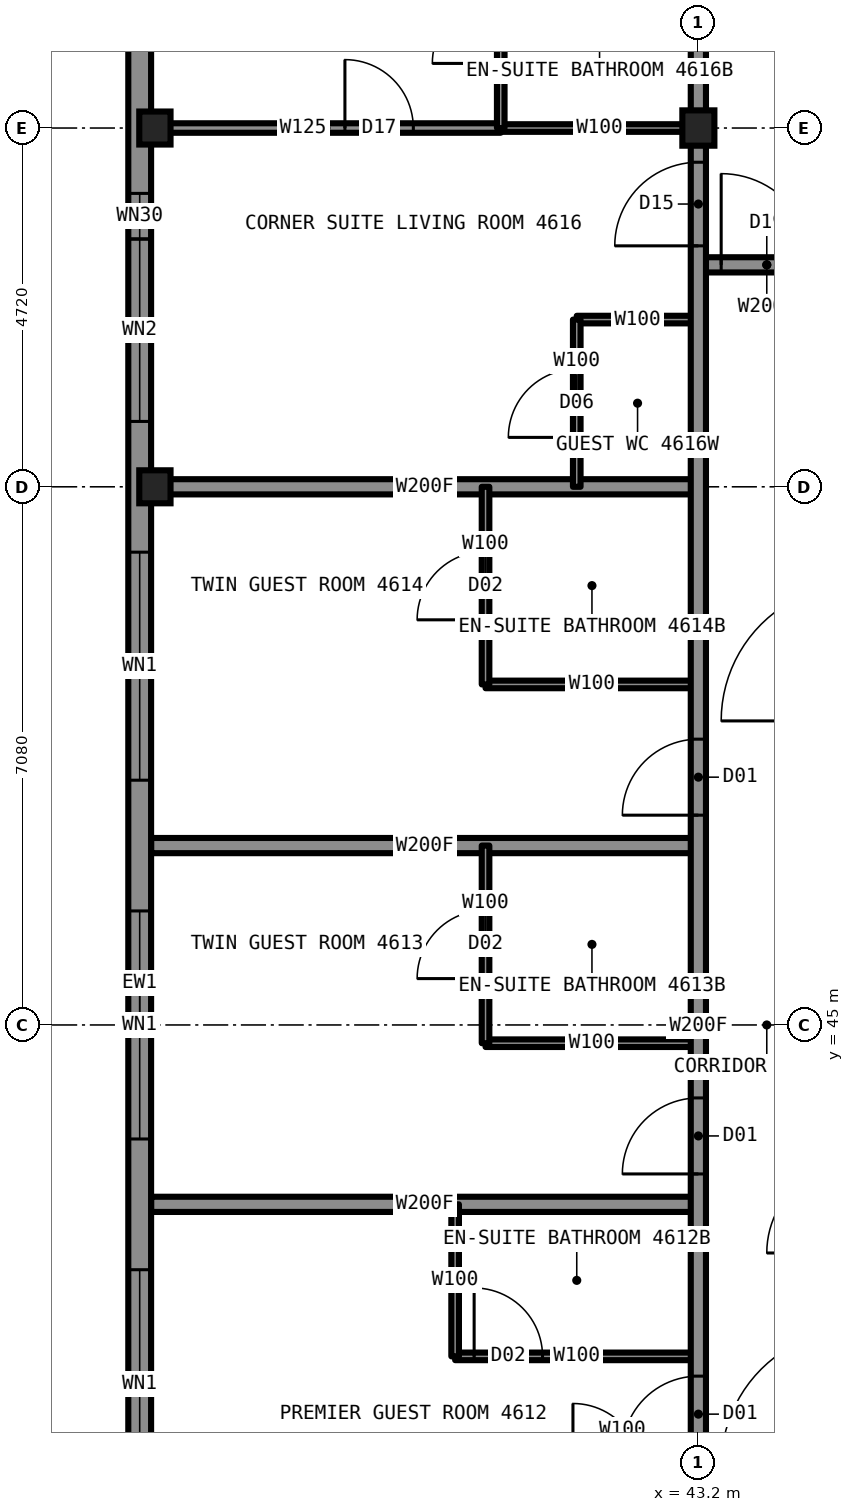
"""IFC4 building model, lengths in metres.
Left out: names, types, materials, properties, quantities, classifications, styles, units other than length and angle.
Written with IfcOpenShell. Run it as: python <this file> out.ifc"""

import sys

from ifc_helpers import new_model, si_unit, direction, frame, frame_2d, origin, origin_2d, place, context, subcontext, project, spatial, rectangle, i_section, extrude, element, fill, save


model = new_model("IFC4")
c1 = context("Model", 3, precision=1e-05, world=origin(), true_north=direction((0.0, 1.0)))
c2 = subcontext(c1, "Body", "Model", "MODEL_VIEW")
j1 = project(units=[si_unit("LENGTHUNIT", "METRE"), si_unit("PLANEANGLEUNIT", "RADIAN")], contexts=[c1])
p1 = place(None, origin())
s1 = spatial("IfcSite", under=j1, at=p1, CompositionType="ELEMENT")
p2 = place(p1, origin())
s2 = spatial("IfcBuilding", under=s1, at=p2, CompositionType="ELEMENT")
p3 = place(p2, frame((0.0, 0.0, 172.3)))
s3 = spatial("IfcBuildingStorey", under=s2, at=p3, CompositionType="ELEMENT", Elevation=172.3)
for number, where, z_axis, x_axis in (
    (1, (36.05, 52.08, 0.0), (0.0, 0.0, 1.0), (1.0, 0.0, 0.0)),
    (2, (36.05, 56.8, 0.0), (0.0, 0.0, 1.0), (1.0, 0.0, 0.0)),
):
    element("IfcColumn", number, at=place(p3, frame(where, z_axis=z_axis, x_axis=x_axis)), inside=s3, PredefinedType="COLUMN", context=c2, shape_type="SweptSolid", body=[
        extrude(i_section(OverallWidth=0.411, OverallDepth=0.434, WebThickness=0.036, FlangeThickness=0.057, at=origin_2d()), origin(), (0.0, 0.0, 1.0), 3.5),
    ])
p4 = place(p3, frame((43.2, 56.8, 0.0), z_axis=(0.0, 0.0, 1.0), x_axis=(1.0, 0.0, 0.0)))
e3 = element("IfcColumn", 3, at=p4, inside=s3, PredefinedType="COLUMN", context=c2, shape_type="SweptSolid", body=[
    extrude(i_section(OverallWidth=0.422, OverallDepth=0.465, WebThickness=0.045, FlangeThickness=0.073, at=origin_2d()), origin(), (0.0, 0.0, 1.0), 3.5),
])
p5 = place(p3, frame((40.4, 44.76, 0.0), z_axis=(0.0, 0.0, 1.0), x_axis=(1.0, 0.0, 0.0)))
e4 = element("IfcWall", 4, at=p5, inside=s3, PredefinedType="PARTITIONING", context=c2, shape_type="SweptSolid", body=[
    extrude(rectangle(XDim=2.8, YDim=0.1, at=frame_2d((1.4, 0.0))), origin(), (0.0, 0.0, 1.0), 3.33),
])
p6 = place(p3, frame((36.0, 42.64, 0.0), z_axis=(0.0, 0.0, 1.0), x_axis=(1.0, 0.0, 0.0)))
e5 = element("IfcWall", 5, at=p6, inside=s3, PredefinedType="PARTITIONING", context=c2, shape_type="SweptSolid", body=[
    extrude(rectangle(XDim=7.2, YDim=0.2, at=frame_2d((3.6, 0.0))), origin(), (0.0, 0.0, 1.0), 2.73),
])
p7 = place(p3, frame((40.0, 40.64, 0.0), z_axis=(0.0, 0.0, 1.0), x_axis=(1.0, 0.0, 0.0)))
e6 = element("IfcWall", 6, at=p7, inside=s3, PredefinedType="PARTITIONING", context=c2, shape_type="SweptSolid", body=[
    extrude(rectangle(XDim=3.2, YDim=0.1, at=frame_2d((1.6, 0.0))), origin(), (0.0, 0.0, 1.0), 3.33),
])
p8 = place(p7, frame((0.25, 0.0, 0.0)))
e7 = element("IfcOpeningElement", 7, at=p8, cuts=e6, PredefinedType="OPENING", context=c2, shape_type="SweptSolid", body=[
    extrude(rectangle(XDim=0.9, YDim=2.1, at=frame_2d((0.45, 1.05))), frame((0.0, 0.06, 0.0), z_axis=(0.0, -1.0, 0.0), x_axis=(1.0, 0.0, 0.0)), (0.0, 0.0, 1.0), 0.12),
])
p9 = place(p3, frame((43.2, 55.0, 0.0), z_axis=(0.0, 0.0, 1.0), x_axis=(1.0, 0.0, 0.0)))
e8 = element("IfcWall", 8, at=p9, inside=s3, PredefinedType="PARTITIONING", context=c2, shape_type="SweptSolid", body=[
    extrude(rectangle(XDim=1.8, YDim=0.2, at=frame_2d((0.9, 0.0))), origin(), (0.0, 0.0, 1.0), 3.33),
])
p10 = place(p9, frame((0.3, 0.0, 0.0)))
e9 = element("IfcOpeningElement", 9, at=p10, cuts=e8, PredefinedType="OPENING", context=c2, shape_type="SweptSolid", body=[
    extrude(rectangle(XDim=1.2, YDim=2.2, at=frame_2d((0.6, 1.1))), frame((0.0, 0.11, 0.0), z_axis=(0.0, -1.0, 0.0), x_axis=(1.0, 0.0, 0.0)), (0.0, 0.0, 1.0), 0.22),
])
p11 = place(p3, frame((40.6, 56.8, 0.0), z_axis=(0.0, 0.0, 1.0), x_axis=(1.0, 0.0, 0.0)))
e10 = element("IfcWall", 10, at=p11, inside=s3, PredefinedType="PARTITIONING", context=c2, shape_type="SweptSolid", body=[
    extrude(rectangle(XDim=2.6, YDim=0.1, at=frame_2d((1.3, 0.0))), origin(), (0.0, 0.0, 1.0), 2.573),
])
p12 = place(p3, frame((36.0, 56.8, 0.0), z_axis=(0.0, 0.0, 1.0), x_axis=(1.0, 0.0, 0.0)))
e11 = element("IfcWall", 11, at=p12, inside=s3, PredefinedType="PARTITIONING", context=c2, shape_type="SweptSolid", body=[
    extrude(rectangle(XDim=4.6, YDim=0.125, at=frame_2d((2.3, 0.0))), origin(), (0.0, 0.0, 1.0), 2.573),
])
p13 = place(p12, frame((2.55, 0.0, 0.0)))
e12 = element("IfcOpeningElement", 12, at=p13, cuts=e11, PredefinedType="OPENING", context=c2, shape_type="SweptSolid", body=[
    extrude(rectangle(XDim=0.9, YDim=2.2, at=frame_2d((0.45, 1.1))), frame((0.0, 0.073, 0.0), z_axis=(0.0, -1.0, 0.0), x_axis=(1.0, 0.0, 0.0)), (0.0, 0.0, 1.0), 0.145),
])
p14 = place(p3, frame((36.0, 47.36, 0.0), z_axis=(0.0, 0.0, 1.0), x_axis=(1.0, 0.0, 0.0)))
e13 = element("IfcWall", 13, at=p14, inside=s3, PredefinedType="PARTITIONING", context=c2, shape_type="SweptSolid", body=[
    extrude(rectangle(XDim=7.2, YDim=0.2, at=frame_2d((3.6, 0.0))), origin(), (0.0, 0.0, 1.0), 2.73),
])
p15 = place(p3, frame((40.4, 49.48, 0.0), z_axis=(0.0, 0.0, 1.0), x_axis=(1.0, 0.0, 0.0)))
e14 = element("IfcWall", 14, at=p15, inside=s3, PredefinedType="PARTITIONING", context=c2, shape_type="SweptSolid", body=[
    extrude(rectangle(XDim=2.8, YDim=0.1, at=frame_2d((1.4, 0.0))), origin(), (0.0, 0.0, 1.0), 3.33),
])
p16 = place(p3, frame((36.0, 52.08, 0.0), z_axis=(0.0, 0.0, 1.0), x_axis=(1.0, 0.0, 0.0)))
e15 = element("IfcWall", 15, at=p16, inside=s3, PredefinedType="PARTITIONING", context=c2, shape_type="SweptSolid", body=[
    extrude(rectangle(XDim=7.2, YDim=0.2, at=frame_2d((3.6, 0.0))), origin(), (0.0, 0.0, 1.0), 2.573),
])
p17 = place(p3, frame((41.6, 54.28, 0.0), z_axis=(0.0, 0.0, 1.0), x_axis=(1.0, 0.0, 0.0)))
e16 = element("IfcWall", 16, at=p17, inside=s3, PredefinedType="PARTITIONING", context=c2, shape_type="SweptSolid", body=[
    extrude(rectangle(XDim=1.6, YDim=0.1, at=frame_2d((0.8, 0.0))), origin(), (0.0, 0.0, 1.0), 3.33),
])
p18 = place(p3, frame((43.2, 33.2, 0.0), z_axis=(0.0, 0.0, 1.0), x_axis=(0.0, 1.0, 0.0)))
e17 = element("IfcWall", 17, at=p18, inside=s3, PredefinedType="PARTITIONING", context=c2, shape_type="SweptSolid", body=[
    extrude(rectangle(XDim=23.58, YDim=0.2, at=frame_2d((11.79, 0.0))), origin(), (0.0, 0.0, 1.0), 3.33),
])
p19 = place(p18, frame((6.18, 0.0, 0.0)))
e18 = element("IfcOpeningElement", 18, at=p19, cuts=e17, PredefinedType="OPENING", context=c2, shape_type="SweptSolid", body=[
    extrude(rectangle(XDim=1.0, YDim=2.2, at=frame_2d((0.5, 1.1))), frame((0.0, 0.11, 0.0), z_axis=(0.0, -1.0, 0.0), x_axis=(1.0, 0.0, 0.0)), (0.0, 0.0, 1.0), 0.22),
])
p20 = place(p18, frame((9.84, 0.0, 0.0)))
e19 = element("IfcOpeningElement", 19, at=p20, cuts=e17, PredefinedType="OPENING", context=c2, shape_type="SweptSolid", body=[
    extrude(rectangle(XDim=1.0, YDim=2.2, at=frame_2d((0.5, 1.1))), frame((0.0, 0.11, 0.0), z_axis=(0.0, -1.0, 0.0), x_axis=(1.0, 0.0, 0.0)), (0.0, 0.0, 1.0), 0.22),
])
p21 = place(p18, frame((14.56, 0.0, 0.0)))
e20 = element("IfcOpeningElement", 20, at=p21, cuts=e17, PredefinedType="OPENING", context=c2, shape_type="SweptSolid", body=[
    extrude(rectangle(XDim=1.0, YDim=2.2, at=frame_2d((0.5, 1.1))), frame((0.0, 0.11, 0.0), z_axis=(0.0, -1.0, 0.0), x_axis=(1.0, 0.0, 0.0)), (0.0, 0.0, 1.0), 0.22),
])
p22 = place(p18, frame((22.05, 0.0, 0.0)))
e21 = element("IfcOpeningElement", 21, at=p22, cuts=e17, PredefinedType="OPENING", context=c2, shape_type="SweptSolid", body=[
    extrude(rectangle(XDim=1.1, YDim=2.2, at=frame_2d((0.55, 1.1))), frame((0.0, 0.11, 0.0), z_axis=(0.0, -1.0, 0.0), x_axis=(1.0, 0.0, 0.0)), (0.0, 0.0, 1.0), 0.22),
])
p23 = place(p18, frame((0.66, 0.0, 0.0)))
e22 = element("IfcOpeningElement", 22, at=p23, cuts=e17, PredefinedType="OPENING", context=c2, shape_type="SweptSolid", body=[
    extrude(rectangle(XDim=1.1, YDim=2.2, at=frame_2d((0.55, 1.1))), frame((0.0, 0.11, 0.0), z_axis=(0.0, -1.0, 0.0), x_axis=(1.0, 0.0, 0.0)), (0.0, 0.0, 1.0), 0.22),
])
p24 = place(p3, frame((41.6, 52.08, 0.0), z_axis=(0.0, 0.0, 1.0), x_axis=(0.0, 1.0, 0.0)))
e23 = element("IfcWall", 23, at=p24, inside=s3, PredefinedType="PARTITIONING", context=c2, shape_type="SweptSolid", body=[
    extrude(rectangle(XDim=2.2, YDim=0.1, at=frame_2d((1.1, 0.0))), origin(), (0.0, 0.0, 1.0), 3.33),
])
p25 = place(p24, frame((0.65, 0.0, 0.0)))
e24 = element("IfcOpeningElement", 24, at=p25, cuts=e23, PredefinedType="OPENING", context=c2, shape_type="SweptSolid", body=[
    extrude(rectangle(XDim=0.9, YDim=2.1, at=frame_2d((0.45, 1.05))), frame((0.0, 0.06, 0.0), z_axis=(0.0, -1.0, 0.0), x_axis=(1.0, 0.0, 0.0)), (0.0, 0.0, 1.0), 0.12),
])
p26 = place(p3, frame((40.6, 56.8, 0.0), z_axis=(0.0, 0.0, 1.0), x_axis=(0.0, 1.0, 0.0)))
e25 = element("IfcWall", 25, at=p26, inside=s3, PredefinedType="PARTITIONING", context=c2, shape_type="SweptSolid", body=[
    extrude(rectangle(XDim=2.6, YDim=0.1, at=frame_2d((1.3, 0.0))), origin(), (0.0, 0.0, 1.0), 3.33),
])
p27 = place(p26, frame((0.85, 0.0, 0.0)))
e26 = element("IfcOpeningElement", 26, at=p27, cuts=e25, PredefinedType="OPENING", context=c2, shape_type="SweptSolid", body=[
    extrude(rectangle(XDim=0.9, YDim=2.1, at=frame_2d((0.45, 1.05))), frame((0.0, 0.06, 0.0), z_axis=(0.0, -1.0, 0.0), x_axis=(1.0, 0.0, 0.0)), (0.0, 0.0, 1.0), 0.12),
])
p28 = place(p3, frame((40.4, 44.76, 0.0), z_axis=(0.0, 0.0, 1.0), x_axis=(0.0, 1.0, 0.0)))
e27 = element("IfcWall", 27, at=p28, inside=s3, PredefinedType="PARTITIONING", context=c2, shape_type="SweptSolid", body=[
    extrude(rectangle(XDim=2.6, YDim=0.1, at=frame_2d((1.3, 0.0))), origin(), (0.0, 0.0, 1.0), 3.33),
])
p29 = place(p28, frame((0.85, 0.0, 0.0)))
e28 = element("IfcOpeningElement", 28, at=p29, cuts=e27, PredefinedType="OPENING", context=c2, shape_type="SweptSolid", body=[
    extrude(rectangle(XDim=0.9, YDim=2.1, at=frame_2d((0.45, 1.05))), frame((0.0, 0.06, 0.0), z_axis=(0.0, -1.0, 0.0), x_axis=(1.0, 0.0, 0.0)), (0.0, 0.0, 1.0), 0.12),
])
p30 = place(p3, frame((40.4, 49.48, 0.0), z_axis=(0.0, 0.0, 1.0), x_axis=(0.0, 1.0, 0.0)))
e29 = element("IfcWall", 29, at=p30, inside=s3, PredefinedType="PARTITIONING", context=c2, shape_type="SweptSolid", body=[
    extrude(rectangle(XDim=2.6, YDim=0.1, at=frame_2d((1.3, 0.0))), origin(), (0.0, 0.0, 1.0), 3.33),
])
p31 = place(p30, frame((0.85, 0.0, 0.0)))
e30 = element("IfcOpeningElement", 30, at=p31, cuts=e29, PredefinedType="OPENING", context=c2, shape_type="SweptSolid", body=[
    extrude(rectangle(XDim=0.9, YDim=2.1, at=frame_2d((0.45, 1.05))), frame((0.0, 0.06, 0.0), z_axis=(0.0, -1.0, 0.0), x_axis=(1.0, 0.0, 0.0)), (0.0, 0.0, 1.0), 0.12),
])
p32 = place(p3, frame((40.0, 40.64, 0.0), z_axis=(0.0, 0.0, 1.0), x_axis=(0.0, 1.0, 0.0)))
e31 = element("IfcWall", 31, at=p32, inside=s3, PredefinedType="PARTITIONING", context=c2, shape_type="SweptSolid", body=[
    extrude(rectangle(XDim=2.0, YDim=0.1, at=frame_2d((1.0, 0.0))), origin(), (0.0, 0.0, 1.0), 3.33),
])
p33 = place(p3, frame((35.85, 58.8, 0.0), z_axis=(0.0, 0.0, 1.0), x_axis=(0.0, -1.0, 0.0)))
e32 = element("IfcWall", 32, at=p33, inside=s3, PredefinedType="SOLIDWALL", context=c2, shape_type="SweptSolid", body=[
    extrude(rectangle(XDim=27.6, YDim=0.3, at=frame_2d((13.8, 0.0))), origin(), (0.0, 0.0, 1.0), 2.83),
])
p34 = place(p33, frame((3.46, 0.0, 0.3)))
e33 = element("IfcOpeningElement", 33, at=p34, cuts=e32, PredefinedType="OPENING", context=c2, shape_type="SweptSolid", body=[
    extrude(rectangle(XDim=2.4, YDim=2.0, at=frame_2d((1.2, 1.0))), frame((0.0, 0.16, 0.0), z_axis=(0.0, -1.0, 0.0), x_axis=(1.0, 0.0, 0.0)), (0.0, 0.0, 1.0), 0.32),
])
p35 = place(p33, frame((7.58, 0.0, 0.3)))
e34 = element("IfcOpeningElement", 34, at=p35, cuts=e32, PredefinedType="OPENING", context=c2, shape_type="SweptSolid", body=[
    extrude(rectangle(XDim=3.0, YDim=2.0, at=frame_2d((1.5, 1.0))), frame((0.0, 0.16, 0.0), z_axis=(0.0, -1.0, 0.0), x_axis=(1.0, 0.0, 0.0)), (0.0, 0.0, 1.0), 0.32),
])
p36 = place(p33, frame((12.3, 0.0, 0.3)))
e35 = element("IfcOpeningElement", 35, at=p36, cuts=e32, PredefinedType="OPENING", context=c2, shape_type="SweptSolid", body=[
    extrude(rectangle(XDim=3.0, YDim=2.0, at=frame_2d((1.5, 1.0))), frame((0.0, 0.16, 0.0), z_axis=(0.0, -1.0, 0.0), x_axis=(1.0, 0.0, 0.0)), (0.0, 0.0, 1.0), 0.32),
])
p37 = place(p33, frame((17.02, 0.0, 0.3)))
e36 = element("IfcOpeningElement", 36, at=p37, cuts=e32, PredefinedType="OPENING", context=c2, shape_type="SweptSolid", body=[
    extrude(rectangle(XDim=3.0, YDim=2.0, at=frame_2d((1.5, 1.0))), frame((0.0, 0.16, 0.0), z_axis=(0.0, -1.0, 0.0), x_axis=(1.0, 0.0, 0.0)), (0.0, 0.0, 1.0), 0.32),
])
p38 = place(p33, frame((21.74, 0.0, 0.3)))
e37 = element("IfcOpeningElement", 37, at=p38, cuts=e32, PredefinedType="OPENING", context=c2, shape_type="SweptSolid", body=[
    extrude(rectangle(XDim=2.4, YDim=2.0, at=frame_2d((1.2, 1.0))), frame((0.0, 0.16, 0.0), z_axis=(0.0, -1.0, 0.0), x_axis=(1.0, 0.0, 0.0)), (0.0, 0.0, 1.0), 0.32),
])
p39 = place(p33, frame((2.86, 0.0, 0.3)))
e38 = element("IfcOpeningElement", 38, at=p39, cuts=e32, PredefinedType="OPENING", context=c2, shape_type="SweptSolid", body=[
    extrude(rectangle(XDim=0.6, YDim=1.1, at=frame_2d((0.3, 0.55))), frame((0.0, 0.16, 0.0), z_axis=(0.0, -1.0, 0.0), x_axis=(1.0, 0.0, 0.0)), (0.0, 0.0, 1.0), 0.32),
])
p40 = place(p33, frame((24.14, 0.0, 0.3)))
e39 = element("IfcOpeningElement", 39, at=p40, cuts=e32, PredefinedType="OPENING", context=c2, shape_type="SweptSolid", body=[
    extrude(rectangle(XDim=0.6, YDim=1.1, at=frame_2d((0.3, 0.55))), frame((0.0, 0.16, 0.0), z_axis=(0.0, -1.0, 0.0), x_axis=(1.0, 0.0, 0.0)), (0.0, 0.0, 1.0), 0.32),
])
p41 = place(p3, frame((43.2, 56.78, 0.0), z_axis=(0.0, 0.0, 1.0), x_axis=(0.0, 1.0, 0.0)))
e40 = element("IfcWall", 40, at=p41, inside=s3, PredefinedType="PARTITIONING", context=c2, shape_type="SweptSolid", body=[
    extrude(rectangle(XDim=2.62, YDim=0.2, at=frame_2d((1.31, 0.0))), origin(), (0.0, 0.0, 1.0), 2.573),
])
p42 = place(p10, origin())
e41 = element("IfcDoor", 41, at=p42, inside=s3, OperationType="SINGLE_SWING_LEFT", PredefinedType="DOOR", context=c2, shape_type="SweptSolid", body=[
    extrude(rectangle(XDim=1.2, YDim=2.2, at=frame_2d((0.6, 1.1))), frame((0.0, 0.025, 0.0), z_axis=(0.0, -1.0, 0.0), x_axis=(1.0, 0.0, 0.0)), (0.0, 0.0, 1.0), 0.05),
])
fill(e9, e41)
p43 = place(p19, origin())
e42 = element("IfcDoor", 42, at=p43, inside=s3, OperationType="SINGLE_SWING_LEFT", PredefinedType="DOOR", context=c2, shape_type="SweptSolid", body=[
    extrude(rectangle(XDim=1.0, YDim=2.2, at=frame_2d((0.5, 1.1))), frame((0.0, 0.025, 0.0), z_axis=(0.0, -1.0, 0.0), x_axis=(1.0, 0.0, 0.0)), (0.0, 0.0, 1.0), 0.05),
])
fill(e18, e42)
p44 = place(p8, origin())
e43 = element("IfcDoor", 43, at=p44, inside=s3, OperationType="SINGLE_SWING_RIGHT", PredefinedType="DOOR", context=c2, shape_type="SweptSolid", body=[
    extrude(rectangle(XDim=0.9, YDim=2.1, at=frame_2d((0.45, 1.05))), frame((0.0, 0.025, 0.0), z_axis=(0.0, -1.0, 0.0), x_axis=(1.0, 0.0, 0.0)), (0.0, 0.0, 1.0), 0.05),
])
fill(e7, e43)
p45 = place(p20, origin())
e44 = element("IfcDoor", 44, at=p45, inside=s3, OperationType="SINGLE_SWING_LEFT", PredefinedType="DOOR", context=c2, shape_type="SweptSolid", body=[
    extrude(rectangle(XDim=1.0, YDim=2.2, at=frame_2d((0.5, 1.1))), frame((0.0, 0.025, 0.0), z_axis=(0.0, -1.0, 0.0), x_axis=(1.0, 0.0, 0.0)), (0.0, 0.0, 1.0), 0.05),
])
fill(e19, e44)
p46 = place(p29, origin())
e45 = element("IfcDoor", 45, at=p46, inside=s3, OperationType="SINGLE_SWING_RIGHT", PredefinedType="DOOR", context=c2, shape_type="SweptSolid", body=[
    extrude(rectangle(XDim=0.9, YDim=2.1, at=frame_2d((0.45, 1.05))), frame((0.0, 0.025, 0.0), z_axis=(0.0, -1.0, 0.0), x_axis=(1.0, 0.0, 0.0)), (0.0, 0.0, 1.0), 0.05),
])
fill(e28, e45)
p47 = place(p21, origin())
e46 = element("IfcDoor", 46, at=p47, inside=s3, OperationType="SINGLE_SWING_LEFT", PredefinedType="DOOR", context=c2, shape_type="SweptSolid", body=[
    extrude(rectangle(XDim=1.0, YDim=2.2, at=frame_2d((0.5, 1.1))), frame((0.0, 0.025, 0.0), z_axis=(0.0, -1.0, 0.0), x_axis=(1.0, 0.0, 0.0)), (0.0, 0.0, 1.0), 0.05),
])
fill(e20, e46)
p48 = place(p31, origin())
e47 = element("IfcDoor", 47, at=p48, inside=s3, OperationType="SINGLE_SWING_RIGHT", PredefinedType="DOOR", context=c2, shape_type="SweptSolid", body=[
    extrude(rectangle(XDim=0.9, YDim=2.1, at=frame_2d((0.45, 1.05))), frame((0.0, 0.025, 0.0), z_axis=(0.0, -1.0, 0.0), x_axis=(1.0, 0.0, 0.0)), (0.0, 0.0, 1.0), 0.05),
])
fill(e30, e47)
p49 = place(p22, origin())
e48 = element("IfcDoor", 48, at=p49, inside=s3, OperationType="SINGLE_SWING_LEFT", PredefinedType="DOOR", context=c2, shape_type="SweptSolid", body=[
    extrude(rectangle(XDim=1.1, YDim=2.2, at=frame_2d((0.55, 1.1))), frame((0.0, 0.025, 0.0), z_axis=(0.0, -1.0, 0.0), x_axis=(1.0, 0.0, 0.0)), (0.0, 0.0, 1.0), 0.05),
])
fill(e21, e48)
p50 = place(p27, origin())
e49 = element("IfcDoor", 49, at=p50, inside=s3, OperationType="SINGLE_SWING_RIGHT", PredefinedType="DOOR", context=c2, shape_type="SweptSolid", body=[
    extrude(rectangle(XDim=0.9, YDim=2.1, at=frame_2d((0.45, 1.05))), frame((0.0, 0.025, 0.0), z_axis=(0.0, -1.0, 0.0), x_axis=(1.0, 0.0, 0.0)), (0.0, 0.0, 1.0), 0.05),
])
fill(e26, e49)
p51 = place(p13, origin())
e50 = element("IfcDoor", 50, at=p51, inside=s3, OperationType="SINGLE_SWING_LEFT", PredefinedType="DOOR", context=c2, shape_type="SweptSolid", body=[
    extrude(rectangle(XDim=0.9, YDim=2.2, at=frame_2d((0.45, 1.1))), frame((0.0, 0.025, 0.0), z_axis=(0.0, -1.0, 0.0), x_axis=(1.0, 0.0, 0.0)), (0.0, 0.0, 1.0), 0.05),
])
fill(e12, e50)
p52 = place(p25, origin())
e51 = element("IfcDoor", 51, at=p52, inside=s3, OperationType="SINGLE_SWING_LEFT", PredefinedType="DOOR", context=c2, shape_type="SweptSolid", body=[
    extrude(rectangle(XDim=0.9, YDim=2.1, at=frame_2d((0.45, 1.05))), frame((0.0, 0.025, 0.0), z_axis=(0.0, -1.0, 0.0), x_axis=(1.0, 0.0, 0.0)), (0.0, 0.0, 1.0), 0.05),
])
fill(e24, e51)
p53 = place(p34, origin())
e52 = element("IfcWindow", 52, at=p53, inside=s3, PartitioningType="SINGLE_PANEL", PredefinedType="WINDOW", context=c2, shape_type="SweptSolid", body=[
    extrude(rectangle(XDim=2.4, YDim=2.0, at=frame_2d((1.2, 1.0))), frame((0.0, 0.13, 0.0), z_axis=(0.0, -1.0, 0.0), x_axis=(1.0, 0.0, 0.0)), (0.0, 0.0, 1.0), 0.06),
])
fill(e33, e52)
p54 = place(p35, origin())
e53 = element("IfcWindow", 53, at=p54, inside=s3, PartitioningType="SINGLE_PANEL", PredefinedType="WINDOW", context=c2, shape_type="SweptSolid", body=[
    extrude(rectangle(XDim=3.0, YDim=2.0, at=frame_2d((1.5, 1.0))), frame((0.0, 0.13, 0.0), z_axis=(0.0, -1.0, 0.0), x_axis=(1.0, 0.0, 0.0)), (0.0, 0.0, 1.0), 0.06),
])
fill(e34, e53)
p55 = place(p36, origin())
e54 = element("IfcWindow", 54, at=p55, inside=s3, PartitioningType="SINGLE_PANEL", PredefinedType="WINDOW", context=c2, shape_type="SweptSolid", body=[
    extrude(rectangle(XDim=3.0, YDim=2.0, at=frame_2d((1.5, 1.0))), frame((0.0, 0.13, 0.0), z_axis=(0.0, -1.0, 0.0), x_axis=(1.0, 0.0, 0.0)), (0.0, 0.0, 1.0), 0.06),
])
fill(e35, e54)
p56 = place(p37, origin())
e55 = element("IfcWindow", 55, at=p56, inside=s3, PartitioningType="SINGLE_PANEL", PredefinedType="WINDOW", context=c2, shape_type="SweptSolid", body=[
    extrude(rectangle(XDim=3.0, YDim=2.0, at=frame_2d((1.5, 1.0))), frame((0.0, 0.13, 0.0), z_axis=(0.0, -1.0, 0.0), x_axis=(1.0, 0.0, 0.0)), (0.0, 0.0, 1.0), 0.06),
])
fill(e36, e55)
p57 = place(p39, origin())
e56 = element("IfcWindow", 56, at=p57, inside=s3, PartitioningType="SINGLE_PANEL", PredefinedType="WINDOW", context=c2, shape_type="SweptSolid", body=[
    extrude(rectangle(XDim=0.6, YDim=1.1, at=frame_2d((0.3, 0.55))), frame((0.0, 0.13, 0.0), z_axis=(0.0, -1.0, 0.0), x_axis=(1.0, 0.0, 0.0)), (0.0, 0.0, 1.0), 0.06),
])
fill(e38, e56)
save(model, sys.argv[1])
